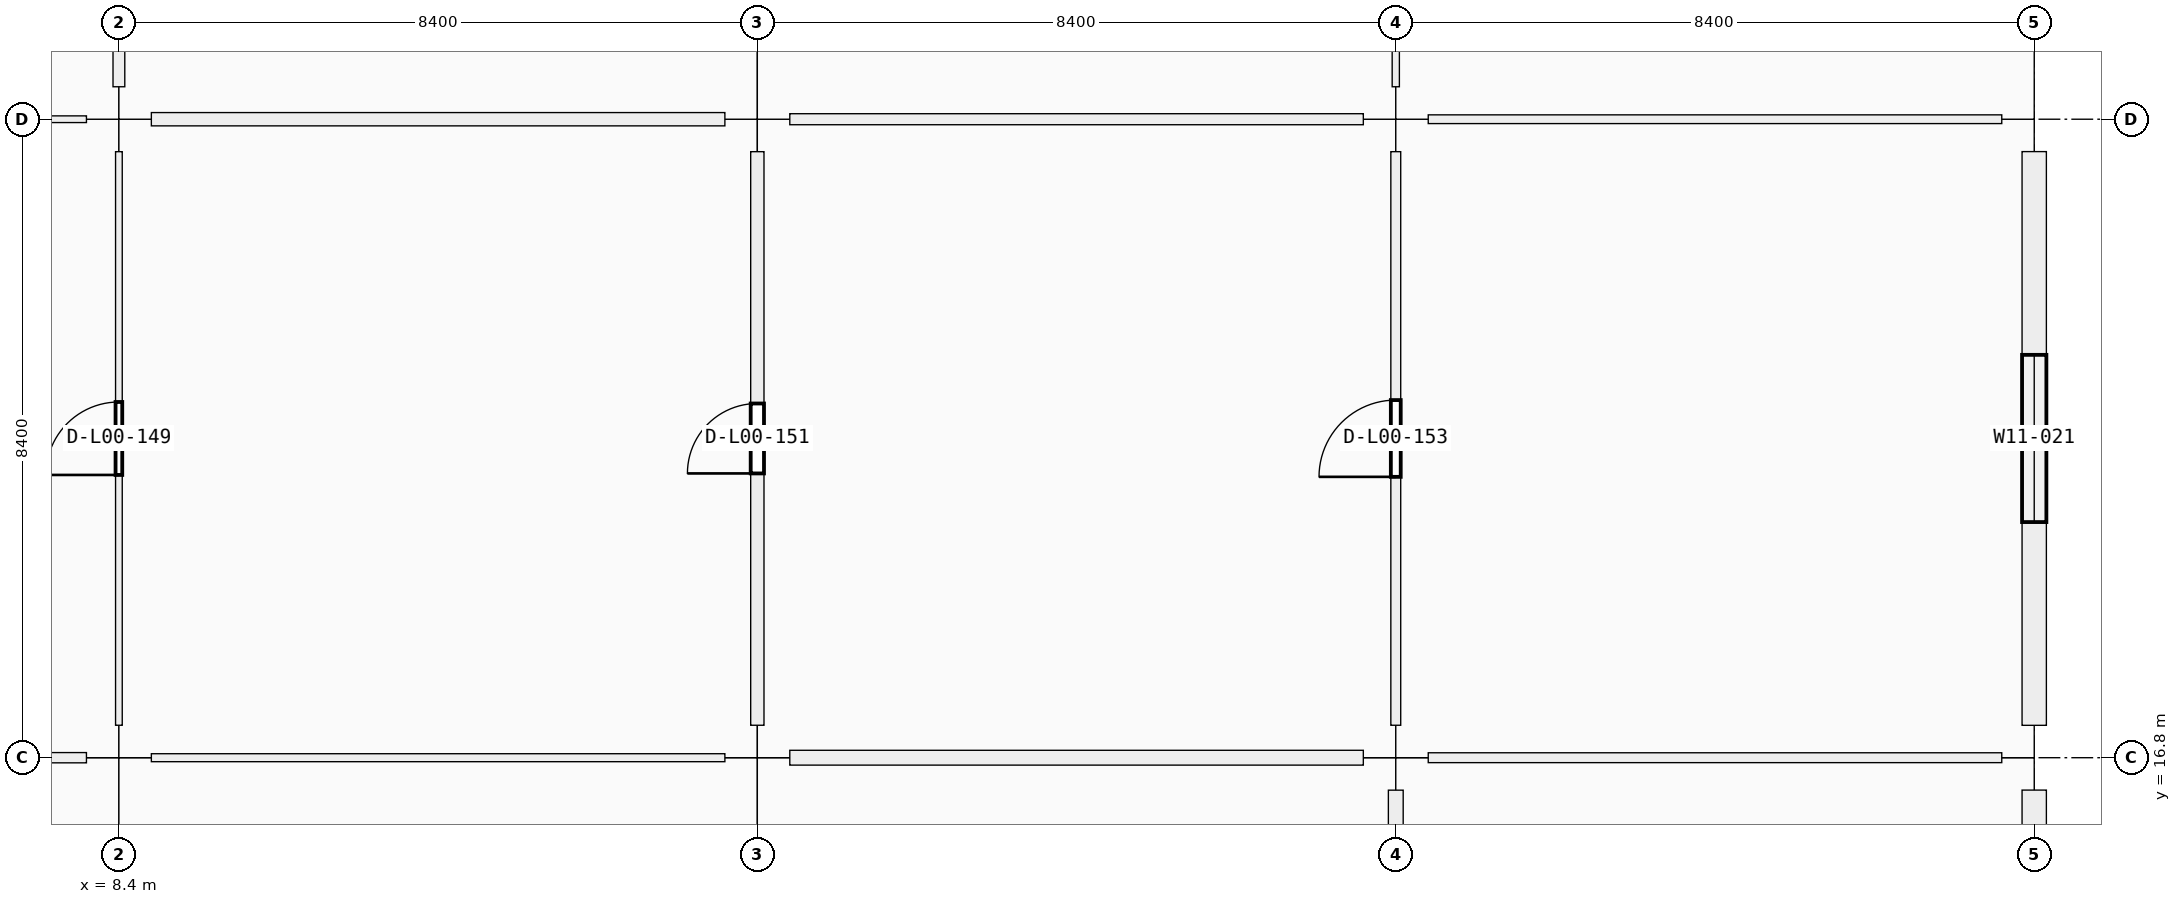
"""IFC4 building model, lengths in metres.
Left out: names, types, materials, properties, quantities, classifications, styles, units other than length and angle.
Written with IfcOpenShell. Run it as: python <this file> out.ifc"""

import sys

from ifc_helpers import new_model, si_unit, direction, frame, frame_2d, origin, origin_2d, place, context, subcontext, project, spatial, rectangle, extrude, element, fill, save


model = new_model("IFC4")
c1 = context("Model", 3, precision=1e-05, world=origin(), true_north=direction((0.0, 1.0)))
c2 = subcontext(c1, "Body", "Model", "MODEL_VIEW")
j1 = project(units=[si_unit("LENGTHUNIT", "METRE"), si_unit("PLANEANGLEUNIT", "RADIAN")], contexts=[c1])
p1 = place(None, origin())
s1 = spatial("IfcSite", under=j1, at=p1, CompositionType="ELEMENT")
p2 = place(p1, origin())
s2 = spatial("IfcBuilding", under=s1, at=p2, CompositionType="ELEMENT")
p3 = place(p2, origin())
s3 = spatial("IfcBuildingStorey", under=s2, at=p3, CompositionType="ELEMENT", Elevation=0.0)
for number, where, z_axis, x_axis in (
    (1, (8.4, 16.8, 0.0), (0.0, 0.0, 1.0), (1.0, 0.0, 0.0)),
    (2, (8.4, 25.2, 0.0), (0.0, 0.0, 1.0), (1.0, 0.0, 0.0)),
    (3, (16.8, 16.8, 0.0), (0.0, 0.0, 1.0), (1.0, 0.0, 0.0)),
    (4, (16.8, 25.2, 0.0), (0.0, 0.0, 1.0), (1.0, 0.0, 0.0)),
    (5, (25.2, 16.8, 0.0), (0.0, 0.0, 1.0), (1.0, 0.0, 0.0)),
    (6, (25.2, 25.2, 0.0), (0.0, 0.0, 1.0), (1.0, 0.0, 0.0)),
    (7, (33.6, 16.8, 0.0), (0.0, 0.0, 1.0), (1.0, 0.0, 0.0)),
    (8, (33.6, 25.2, 0.0), (0.0, 0.0, 1.0), (1.0, 0.0, 0.0)),
):
    element("IfcColumn", number, at=place(p3, frame(where, z_axis=z_axis, x_axis=x_axis)), inside=s3, PredefinedType="COLUMN", context=c2, shape_type="SweptSolid", body=[
        extrude(rectangle(XDim=0.85, YDim=0.85, at=origin_2d()), origin(), (0.0, 0.0, 1.0), 5.76),
    ])
p4 = place(p3, frame((33.6, 16.374, 0.0), z_axis=(0.0, 0.0, 1.0), x_axis=(0.0, -1.0, 0.0)))
e9 = element("IfcWall", 9, at=p4, inside=s3, PredefinedType="SOLIDWALL", context=c2, shape_type="SweptSolid", body=[
    extrude(rectangle(XDim=7.623, YDim=0.32, at=frame_2d((3.812, 0.0))), origin(), (0.0, 0.0, 1.0), 4.7),
])
p5 = place(p4, frame((2.462, 0.0, 0.9)))
e10 = element("IfcOpeningElement", 10, at=p5, cuts=e9, PredefinedType="OPENING", context=c2, shape_type="SweptSolid", body=[
    extrude(rectangle(XDim=2.7, YDim=1.2, at=frame_2d((1.35, 0.6))), frame((0.0, 0.16, 0.0), z_axis=(0.0, -1.0, 0.0), x_axis=(1.0, 0.0, 0.0)), (0.0, 0.0, 1.0), 0.32),
])
p6 = place(p3, frame((33.6, 24.774, 0.0), z_axis=(0.0, 0.0, 1.0), x_axis=(0.0, -1.0, 0.0)))
e11 = element("IfcWall", 11, at=p6, inside=s3, PredefinedType="SOLIDWALL", context=c2, shape_type="SweptSolid", body=[
    extrude(rectangle(XDim=7.548, YDim=0.32, at=frame_2d((3.774, 0.0))), origin(), (0.0, 0.0, 1.0), 4.7),
])
p7 = place(p6, frame((2.674, 0.0, 0.9)))
e12 = element("IfcOpeningElement", 12, at=p7, cuts=e11, PredefinedType="OPENING", context=c2, shape_type="SweptSolid", body=[
    extrude(rectangle(XDim=2.2, YDim=1.35, at=frame_2d((1.1, 0.675))), frame((0.0, 0.16, 0.0), z_axis=(0.0, -1.0, 0.0), x_axis=(1.0, 0.0, 0.0)), (0.0, 0.0, 1.0), 0.32),
])
p8 = place(p3, frame((0.327, 16.8, 0.0), z_axis=(0.0, 0.0, 1.0), x_axis=(1.0, 0.0, 0.0)))
e13 = element("IfcWall", 13, at=p8, inside=s3, PredefinedType="PARTITIONING", context=c2, shape_type="SweptSolid", body=[
    extrude(rectangle(XDim=7.646, YDim=0.135, at=frame_2d((3.823, 0.0))), origin(), (0.0, 0.0, 1.0), 3.66),
])
p9 = place(p8, frame((3.358, 0.0, 0.0)))
e14 = element("IfcOpeningElement", 14, at=p9, cuts=e13, PredefinedType="OPENING", context=c2, shape_type="SweptSolid", body=[
    extrude(rectangle(XDim=0.93, YDim=2.12, at=frame_2d((0.465, 1.06))), frame((0.0, 0.067, 0.0), z_axis=(0.0, -1.0, 0.0), x_axis=(1.0, 0.0, 0.0)), (0.0, 0.0, 1.0), 0.135),
])
p10 = place(p3, frame((0.302, 25.2, 0.0), z_axis=(0.0, 0.0, 1.0), x_axis=(1.0, 0.0, 0.0)))
e15 = element("IfcWall", 15, at=p10, inside=s3, PredefinedType="PARTITIONING", context=c2, shape_type="SweptSolid", body=[
    extrude(rectangle(XDim=7.671, YDim=0.088, at=frame_2d((3.835, 0.0))), origin(), (0.0, 0.0, 1.0), 3.66),
])
p11 = place(p10, frame((3.311, 0.0, 0.0)))
e16 = element("IfcOpeningElement", 16, at=p11, cuts=e15, PredefinedType="OPENING", context=c2, shape_type="SweptSolid", body=[
    extrude(rectangle(XDim=1.05, YDim=2.12, at=frame_2d((0.525, 1.06))), frame((0.0, 0.044, 0.0), z_axis=(0.0, -1.0, 0.0), x_axis=(1.0, 0.0, 0.0)), (0.0, 0.0, 1.0), 0.088),
])
p12 = place(p3, frame((8.827, 16.8, 0.0), z_axis=(0.0, 0.0, 1.0), x_axis=(1.0, 0.0, 0.0)))
e17 = element("IfcWall", 17, at=p12, inside=s3, PredefinedType="PARTITIONING", context=c2, shape_type="SweptSolid", body=[
    extrude(rectangle(XDim=7.546, YDim=0.105, at=frame_2d((3.773, 0.0))), origin(), (0.0, 0.0, 1.0), 3.66),
])
p13 = place(p12, frame((3.273, 0.0, 0.0)))
e18 = element("IfcOpeningElement", 18, at=p13, cuts=e17, PredefinedType="OPENING", context=c2, shape_type="SweptSolid", body=[
    extrude(rectangle(XDim=1.0, YDim=2.2, at=frame_2d((0.5, 1.1))), frame((0.0, 0.052, 0.0), z_axis=(0.0, -1.0, 0.0), x_axis=(1.0, 0.0, 0.0)), (0.0, 0.0, 1.0), 0.105),
])
p14 = place(p3, frame((8.827, 25.2, 0.0), z_axis=(0.0, 0.0, 1.0), x_axis=(1.0, 0.0, 0.0)))
e19 = element("IfcWall", 19, at=p14, inside=s3, PredefinedType="PARTITIONING", context=c2, shape_type="SweptSolid", body=[
    extrude(rectangle(XDim=7.546, YDim=0.175, at=frame_2d((3.773, 0.0))), origin(), (0.0, 0.0, 1.0), 3.66),
])
p15 = place(p14, frame((3.253, 0.0, 0.0)))
e20 = element("IfcOpeningElement", 20, at=p15, cuts=e19, PredefinedType="OPENING", context=c2, shape_type="SweptSolid", body=[
    extrude(rectangle(XDim=1.04, YDim=2.2, at=frame_2d((0.52, 1.1))), frame((0.0, 0.087, 0.0), z_axis=(0.0, -1.0, 0.0), x_axis=(1.0, 0.0, 0.0)), (0.0, 0.0, 1.0), 0.175),
])
p16 = place(p3, frame((17.227, 16.8, 0.0), z_axis=(0.0, 0.0, 1.0), x_axis=(1.0, 0.0, 0.0)))
e21 = element("IfcWall", 21, at=p16, inside=s3, PredefinedType="PARTITIONING", context=c2, shape_type="SweptSolid", body=[
    extrude(rectangle(XDim=7.546, YDim=0.195, at=frame_2d((3.773, 0.0))), origin(), (0.0, 0.0, 1.0), 3.66),
])
p17 = place(p16, frame((3.283, 0.0, 0.0)))
e22 = element("IfcOpeningElement", 22, at=p17, cuts=e21, PredefinedType="OPENING", context=c2, shape_type="SweptSolid", body=[
    extrude(rectangle(XDim=0.98, YDim=2.18, at=frame_2d((0.49, 1.09))), frame((0.0, 0.098, 0.0), z_axis=(0.0, -1.0, 0.0), x_axis=(1.0, 0.0, 0.0)), (0.0, 0.0, 1.0), 0.195),
])
p18 = place(p3, frame((17.227, 25.2, 0.0), z_axis=(0.0, 0.0, 1.0), x_axis=(1.0, 0.0, 0.0)))
e23 = element("IfcWall", 23, at=p18, inside=s3, PredefinedType="PARTITIONING", context=c2, shape_type="SweptSolid", body=[
    extrude(rectangle(XDim=7.546, YDim=0.145, at=frame_2d((3.773, 0.0))), origin(), (0.0, 0.0, 1.0), 3.66),
])
p19 = place(p18, frame((3.273, 0.0, 0.0)))
e24 = element("IfcOpeningElement", 24, at=p19, cuts=e23, PredefinedType="OPENING", context=c2, shape_type="SweptSolid", body=[
    extrude(rectangle(XDim=1.0, YDim=2.2, at=frame_2d((0.5, 1.1))), frame((0.0, 0.073, 0.0), z_axis=(0.0, -1.0, 0.0), x_axis=(1.0, 0.0, 0.0)), (0.0, 0.0, 1.0), 0.145),
])
p20 = place(p3, frame((25.627, 16.8, 0.0), z_axis=(0.0, 0.0, 1.0), x_axis=(1.0, 0.0, 0.0)))
e25 = element("IfcWall", 25, at=p20, inside=s3, PredefinedType="MOVABLE", context=c2, shape_type="SweptSolid", body=[
    extrude(rectangle(XDim=7.546, YDim=0.13, at=frame_2d((3.773, 0.0))), origin(), (0.0, 0.0, 1.0), 3.66),
])
p21 = place(p20, frame((3.303, 0.0, 0.0)))
e26 = element("IfcOpeningElement", 26, at=p21, cuts=e25, PredefinedType="OPENING", context=c2, shape_type="SweptSolid", body=[
    extrude(rectangle(XDim=0.94, YDim=2.15, at=frame_2d((0.47, 1.075))), frame((0.0, 0.065, 0.0), z_axis=(0.0, -1.0, 0.0), x_axis=(1.0, 0.0, 0.0)), (0.0, 0.0, 1.0), 0.13),
])
p22 = place(p3, frame((25.627, 25.2, 0.0), z_axis=(0.0, 0.0, 1.0), x_axis=(1.0, 0.0, 0.0)))
e27 = element("IfcWall", 27, at=p22, inside=s3, PredefinedType="PARTITIONING", context=c2, shape_type="SweptSolid", body=[
    extrude(rectangle(XDim=7.546, YDim=0.115, at=frame_2d((3.773, 0.0))), origin(), (0.0, 0.0, 1.0), 3.66),
])
p23 = place(p22, frame((3.288, 0.0, 0.0)))
e28 = element("IfcOpeningElement", 28, at=p23, cuts=e27, PredefinedType="OPENING", context=c2, shape_type="SweptSolid", body=[
    extrude(rectangle(XDim=0.97, YDim=2.12, at=frame_2d((0.485, 1.06))), frame((0.0, 0.058, 0.0), z_axis=(0.0, -1.0, 0.0), x_axis=(1.0, 0.0, 0.0)), (0.0, 0.0, 1.0), 0.115),
])
p24 = place(p3, frame((8.4, 17.227, 0.0), z_axis=(0.0, 0.0, 1.0), x_axis=(0.0, 1.0, 0.0)))
e29 = element("IfcWall", 29, at=p24, inside=s3, PredefinedType="PARTITIONING", context=c2, shape_type="SweptSolid", body=[
    extrude(rectangle(XDim=7.546, YDim=0.088, at=frame_2d((3.773, 0.0))), origin(), (0.0, 0.0, 1.0), 3.66),
])
p25 = place(p24, frame((3.293, 0.0, 0.0)))
e30 = element("IfcOpeningElement", 30, at=p25, cuts=e29, PredefinedType="OPENING", context=c2, shape_type="SweptSolid", body=[
    extrude(rectangle(XDim=0.96, YDim=2.18, at=frame_2d((0.48, 1.09))), frame((0.0, 0.044, 0.0), z_axis=(0.0, -1.0, 0.0), x_axis=(1.0, 0.0, 0.0)), (0.0, 0.0, 1.0), 0.088),
])
p26 = place(p3, frame((8.4, 25.627, 0.0), z_axis=(0.0, 0.0, 1.0), x_axis=(0.0, 1.0, 0.0)))
e31 = element("IfcWall", 31, at=p26, inside=s3, PredefinedType="PARTITIONING", context=c2, shape_type="SweptSolid", body=[
    extrude(rectangle(XDim=7.546, YDim=0.155, at=frame_2d((3.773, 0.0))), origin(), (0.0, 0.0, 1.0), 3.66),
])
p27 = place(p26, frame((3.253, 0.0, 0.0)))
e32 = element("IfcOpeningElement", 32, at=p27, cuts=e31, PredefinedType="OPENING", context=c2, shape_type="SweptSolid", body=[
    extrude(rectangle(XDim=1.04, YDim=2.2, at=frame_2d((0.52, 1.1))), frame((0.0, 0.078, 0.0), z_axis=(0.0, -1.0, 0.0), x_axis=(1.0, 0.0, 0.0)), (0.0, 0.0, 1.0), 0.155),
])
p28 = place(p3, frame((16.8, 17.227, 0.0), z_axis=(0.0, 0.0, 1.0), x_axis=(0.0, 1.0, 0.0)))
e33 = element("IfcWall", 33, at=p28, inside=s3, PredefinedType="PARTITIONING", context=c2, shape_type="SweptSolid", body=[
    extrude(rectangle(XDim=7.546, YDim=0.175, at=frame_2d((3.773, 0.0))), origin(), (0.0, 0.0, 1.0), 3.66),
])
p29 = place(p28, frame((3.313, 0.0, 0.0)))
e34 = element("IfcOpeningElement", 34, at=p29, cuts=e33, PredefinedType="OPENING", context=c2, shape_type="SweptSolid", body=[
    extrude(rectangle(XDim=0.92, YDim=2.15, at=frame_2d((0.46, 1.075))), frame((0.0, 0.087, 0.0), z_axis=(0.0, -1.0, 0.0), x_axis=(1.0, 0.0, 0.0)), (0.0, 0.0, 1.0), 0.175),
])
p30 = place(p3, frame((25.2, 8.777, 0.0), z_axis=(0.0, 0.0, 1.0), x_axis=(0.0, 1.0, 0.0)))
e35 = element("IfcWall", 35, at=p30, inside=s3, PredefinedType="PARTITIONING", context=c2, shape_type="SweptSolid", body=[
    extrude(rectangle(XDim=7.596, YDim=0.195, at=frame_2d((3.798, 0.0))), origin(), (0.0, 0.0, 1.0), 3.66),
])
p31 = place(p30, frame((3.328, 0.0, 0.0)))
e36 = element("IfcOpeningElement", 36, at=p31, cuts=e35, PredefinedType="OPENING", context=c2, shape_type="SweptSolid", body=[
    extrude(rectangle(XDim=0.94, YDim=2.15, at=frame_2d((0.47, 1.075))), frame((0.0, 0.098, 0.0), z_axis=(0.0, -1.0, 0.0), x_axis=(1.0, 0.0, 0.0)), (0.0, 0.0, 1.0), 0.195),
])
p32 = place(p3, frame((25.2, 17.227, 0.0), z_axis=(0.0, 0.0, 1.0), x_axis=(0.0, 1.0, 0.0)))
e37 = element("IfcWall", 37, at=p32, inside=s3, PredefinedType="MOVABLE", context=c2, shape_type="SweptSolid", body=[
    extrude(rectangle(XDim=7.546, YDim=0.13, at=frame_2d((3.773, 0.0))), origin(), (0.0, 0.0, 1.0), 3.66),
])
p33 = place(p32, frame((3.268, 0.0, 0.0)))
e38 = element("IfcOpeningElement", 38, at=p33, cuts=e37, PredefinedType="OPENING", context=c2, shape_type="SweptSolid", body=[
    extrude(rectangle(XDim=1.01, YDim=2.12, at=frame_2d((0.505, 1.06))), frame((0.0, 0.065, 0.0), z_axis=(0.0, -1.0, 0.0), x_axis=(1.0, 0.0, 0.0)), (0.0, 0.0, 1.0), 0.13),
])
p34 = place(p3, frame((25.2, 25.627, 0.0), z_axis=(0.0, 0.0, 1.0), x_axis=(0.0, 1.0, 0.0)))
e39 = element("IfcWall", 39, at=p34, inside=s3, PredefinedType="PARTITIONING", context=c2, shape_type="SweptSolid", body=[
    extrude(rectangle(XDim=7.546, YDim=0.095, at=frame_2d((3.773, 0.0))), origin(), (0.0, 0.0, 1.0), 3.66),
])
p35 = place(p34, frame((3.283, 0.0, 0.0)))
e40 = element("IfcOpeningElement", 40, at=p35, cuts=e39, PredefinedType="OPENING", context=c2, shape_type="SweptSolid", body=[
    extrude(rectangle(XDim=0.98, YDim=2.18, at=frame_2d((0.49, 1.09))), frame((0.0, 0.047, 0.0), z_axis=(0.0, -1.0, 0.0), x_axis=(1.0, 0.0, 0.0)), (0.0, 0.0, 1.0), 0.095),
])
p36 = place(p7, origin())
e41 = element("IfcWindow", 41, at=p36, inside=s3, PartitioningType="SINGLE_PANEL", PredefinedType="WINDOW", context=c2, shape_type="SweptSolid", body=[
    extrude(rectangle(XDim=2.2, YDim=1.35, at=frame_2d((1.1, 0.675))), frame((0.0, 0.03, 0.0), z_axis=(0.0, -1.0, 0.0), x_axis=(1.0, 0.0, 0.0)), (0.0, 0.0, 1.0), 0.06),
])
fill(e12, e41)
p37 = place(p15, origin())
e42 = element("IfcDoor", 42, at=p37, inside=s3, OperationType="SINGLE_SWING_LEFT", PredefinedType="DOOR", context=c2, shape_type="SweptSolid", body=[
    extrude(rectangle(XDim=1.04, YDim=2.2, at=frame_2d((0.52, 1.1))), frame((0.0, 0.025, 0.0), z_axis=(0.0, -1.0, 0.0), x_axis=(1.0, 0.0, 0.0)), (0.0, 0.0, 1.0), 0.05),
])
fill(e20, e42)
p38 = place(p19, origin())
e43 = element("IfcDoor", 43, at=p38, inside=s3, OperationType="SINGLE_SWING_LEFT", PredefinedType="DOOR", context=c2, shape_type="SweptSolid", body=[
    extrude(rectangle(XDim=1.0, YDim=2.2, at=frame_2d((0.5, 1.1))), frame((0.0, 0.025, 0.0), z_axis=(0.0, -1.0, 0.0), x_axis=(1.0, 0.0, 0.0)), (0.0, 0.0, 1.0), 0.05),
])
fill(e24, e43)
p39 = place(p13, origin())
e44 = element("IfcDoor", 44, at=p39, inside=s3, OperationType="SINGLE_SWING_RIGHT", PredefinedType="DOOR", context=c2, shape_type="SweptSolid", body=[
    extrude(rectangle(XDim=1.0, YDim=2.2, at=frame_2d((0.5, 1.1))), frame((0.0, 0.025, 0.0), z_axis=(0.0, -1.0, 0.0), x_axis=(1.0, 0.0, 0.0)), (0.0, 0.0, 1.0), 0.05),
])
fill(e18, e44)
p40 = place(p17, origin())
e45 = element("IfcDoor", 45, at=p40, inside=s3, OperationType="SINGLE_SWING_LEFT", PredefinedType="DOOR", context=c2, shape_type="SweptSolid", body=[
    extrude(rectangle(XDim=0.98, YDim=2.18, at=frame_2d((0.49, 1.09))), frame((0.0, 0.025, 0.0), z_axis=(0.0, -1.0, 0.0), x_axis=(1.0, 0.0, 0.0)), (0.0, 0.0, 1.0), 0.05),
])
fill(e22, e45)
p41 = place(p21, origin())
e46 = element("IfcDoor", 46, at=p41, inside=s3, OperationType="SINGLE_SWING_LEFT", PredefinedType="DOOR", context=c2, shape_type="SweptSolid", body=[
    extrude(rectangle(XDim=0.94, YDim=2.15, at=frame_2d((0.47, 1.075))), frame((0.0, 0.025, 0.0), z_axis=(0.0, -1.0, 0.0), x_axis=(1.0, 0.0, 0.0)), (0.0, 0.0, 1.0), 0.05),
])
fill(e26, e46)
p42 = place(p23, origin())
e47 = element("IfcDoor", 47, at=p42, inside=s3, OperationType="SINGLE_SWING_LEFT", PredefinedType="DOOR", context=c2, shape_type="SweptSolid", body=[
    extrude(rectangle(XDim=0.97, YDim=2.12, at=frame_2d((0.485, 1.06))), frame((0.0, 0.025, 0.0), z_axis=(0.0, -1.0, 0.0), x_axis=(1.0, 0.0, 0.0)), (0.0, 0.0, 1.0), 0.05),
])
fill(e28, e47)
p43 = place(p25, origin())
e48 = element("IfcDoor", 48, at=p43, inside=s3, OperationType="SINGLE_SWING_LEFT", PredefinedType="DOOR", context=c2, shape_type="SweptSolid", body=[
    extrude(rectangle(XDim=0.96, YDim=2.18, at=frame_2d((0.48, 1.09))), frame((0.0, 0.025, 0.0), z_axis=(0.0, -1.0, 0.0), x_axis=(1.0, 0.0, 0.0)), (0.0, 0.0, 1.0), 0.05),
])
fill(e30, e48)
p44 = place(p29, origin())
e49 = element("IfcDoor", 49, at=p44, inside=s3, OperationType="SINGLE_SWING_LEFT", PredefinedType="DOOR", context=c2, shape_type="SweptSolid", body=[
    extrude(rectangle(XDim=0.92, YDim=2.15, at=frame_2d((0.46, 1.075))), frame((0.0, 0.025, 0.0), z_axis=(0.0, -1.0, 0.0), x_axis=(1.0, 0.0, 0.0)), (0.0, 0.0, 1.0), 0.05),
])
fill(e34, e49)
p45 = place(p33, origin())
e50 = element("IfcDoor", 50, at=p45, inside=s3, OperationType="SINGLE_SWING_LEFT", PredefinedType="DOOR", context=c2, shape_type="SweptSolid", body=[
    extrude(rectangle(XDim=1.01, YDim=2.12, at=frame_2d((0.505, 1.06))), frame((0.0, 0.025, 0.0), z_axis=(0.0, -1.0, 0.0), x_axis=(1.0, 0.0, 0.0)), (0.0, 0.0, 1.0), 0.05),
])
fill(e38, e50)
save(model, sys.argv[1])
